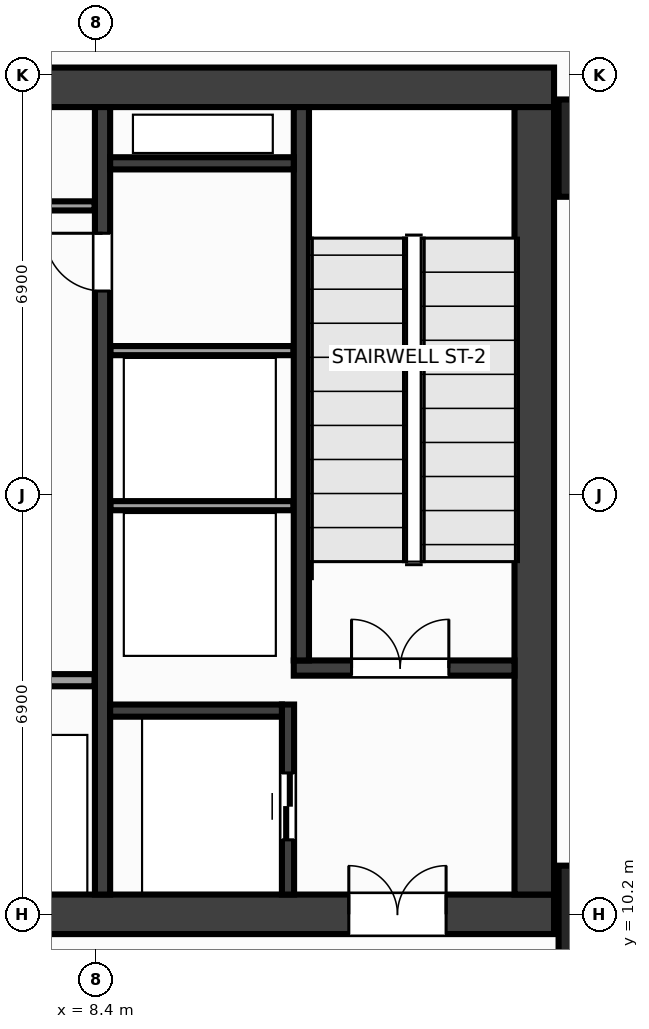
"""IFC4 building model, lengths in metres.
Left out: names, types, materials, properties, quantities, classifications, styles, units other than length and angle.
Written with IfcOpenShell. Run it as: python <this file> out.ifc"""

import sys

from ifc_helpers import new_model, si_unit, direction, frame, frame_2d, origin, origin_2d, place, context, subcontext, project, spatial, rectangle, extrude, source, transform, mapped, element, fill, save


model = new_model("IFC4")
c1 = context("Model", 3, precision=1e-05, world=origin(), true_north=direction((0.0, 1.0)))
c2 = subcontext(c1, "Body", "Model", "MODEL_VIEW")
j1 = project(units=[si_unit("LENGTHUNIT", "METRE"), si_unit("PLANEANGLEUNIT", "RADIAN")], contexts=[c1])
p1 = place(None, origin())
s1 = spatial("IfcSite", under=j1, at=p1, CompositionType="ELEMENT")
p2 = place(p1, origin())
s2 = spatial("IfcBuilding", under=s1, at=p2, CompositionType="ELEMENT")
p3 = place(p2, frame((0.0, 0.0, 189.2)))
s3 = spatial("IfcBuildingStorey", under=s2, at=p3, CompositionType="ELEMENT", Elevation=189.2)
m1 = source(origin(), c2, "Body", "SweptSolid", [
    extrude(rectangle(XDim=31.85, YDim=0.65, at=frame_2d((15.925, 0.0))), origin(), (0.0, 0.0, 1.0), 7.2),
])
p4 = place(p3, frame((-15.925, 23.8, 0.0), z_axis=(0.0, 0.0, 1.0), x_axis=(1.0, 0.0, 0.0)))
e1 = element("IfcWall", 1, at=p4, inside=s3, PredefinedType="SHEAR", context=c2, shape_type="MappedRepresentation", body=[
    mapped(m1, transform((0.0, 0.0, 0.0), x_axis=(1.0, 0.0, 0.0), y_axis=(0.0, 1.0, 0.0), z_axis=(0.0, 0.0, 1.0), scale=1.0)),
])
p5 = place(p3, frame((-15.925, 10.2, 0.0), z_axis=(0.0, 0.0, 1.0), x_axis=(1.0, 0.0, 0.0)))
e2 = element("IfcWall", 2, at=p5, inside=s3, PredefinedType="SHEAR", context=c2, shape_type="MappedRepresentation", body=[
    mapped(m1, transform((0.0, 0.0, 0.0), x_axis=(1.0, 0.0, 0.0), y_axis=(0.0, 1.0, 0.0), z_axis=(0.0, 0.0, 1.0), scale=1.0)),
])
p6 = place(p5, frame((1.775, 0.0, 0.0)))
e3 = element("IfcOpeningElement", 3, at=p6, cuts=e2, PredefinedType="OPENING", context=c2, shape_type="SweptSolid", body=[
    extrude(rectangle(XDim=1.6, YDim=2.15, at=frame_2d((0.8, 1.075))), frame((0.0, 0.337, 0.0), z_axis=(0.0, -1.0, 0.0), x_axis=(1.0, 0.0, 0.0)), (0.0, 0.0, 1.0), 0.674),
])
p7 = place(p5, frame((28.475, 0.0, 0.0)))
e4 = element("IfcOpeningElement", 4, at=p7, cuts=e2, PredefinedType="OPENING", context=c2, shape_type="SweptSolid", body=[
    extrude(rectangle(XDim=1.6, YDim=2.15, at=frame_2d((0.8, 1.075))), frame((0.0, 0.337, 0.0), z_axis=(0.0, -1.0, 0.0), x_axis=(1.0, 0.0, 0.0)), (0.0, 0.0, 1.0), 0.674),
])
p8 = place(p5, frame((15.175, 0.0, 0.0)))
e5 = element("IfcOpeningElement", 5, at=p8, cuts=e2, PredefinedType="OPENING", context=c2, shape_type="SweptSolid", body=[
    extrude(rectangle(XDim=1.5, YDim=2.2, at=frame_2d((0.75, 1.1))), frame((0.0, 0.337, 0.0), z_axis=(0.0, -1.0, 0.0), x_axis=(1.0, 0.0, 0.0)), (0.0, 0.0, 1.0), 0.674),
])
m2 = source(origin(), c2, "Body", "SweptSolid", [
    extrude(rectangle(XDim=12.95, YDim=0.65, at=frame_2d((6.475, 0.0))), origin(), (0.0, 0.0, 1.0), 7.2),
])
p9 = place(p3, frame((15.6, 10.525, 0.0), z_axis=(0.0, 0.0, 1.0), x_axis=(0.0, 1.0, 0.0)))
e6 = element("IfcWall", 6, at=p9, inside=s3, PredefinedType="SHEAR", context=c2, shape_type="MappedRepresentation", body=[
    mapped(m2, transform((0.0, 0.0, 0.0), x_axis=(1.0, 0.0, 0.0), y_axis=(0.0, 1.0, 0.0), z_axis=(0.0, 0.0, 1.0), scale=1.0)),
])
m3 = source(origin(), c2, "Body", "SweptSolid", [
    extrude(rectangle(XDim=12.95, YDim=0.25, at=frame_2d((6.475, 0.0))), origin(), (0.0, 0.0, 1.0), 7.2),
])
p10 = place(p3, frame((8.5, 10.525, 0.0), z_axis=(0.0, 0.0, 1.0), x_axis=(0.0, 1.0, 0.0)))
e7 = element("IfcWall", 7, at=p10, inside=s3, PredefinedType="SHEAR", context=c2, shape_type="MappedRepresentation", body=[
    mapped(m3, transform((0.0, 0.0, 0.0), x_axis=(1.0, 0.0, 0.0), y_axis=(0.0, 1.0, 0.0), z_axis=(0.0, 0.0, 1.0), scale=1.0)),
])
p11 = place(p10, frame((9.925, 0.0, 0.0)))
e8 = element("IfcOpeningElement", 8, at=p11, cuts=e7, PredefinedType="OPENING", context=c2, shape_type="SweptSolid", body=[
    extrude(rectangle(XDim=0.95, YDim=2.15, at=frame_2d((0.475, 1.075))), frame((0.0, 0.137, 0.0), z_axis=(0.0, -1.0, 0.0), x_axis=(1.0, 0.0, 0.0)), (0.0, 0.0, 1.0), 0.274),
])
m4 = source(origin(), c2, "Body", "SweptSolid", [
    extrude(rectangle(XDim=3.63, YDim=0.25, at=frame_2d((1.815, 0.0))), origin(), (0.0, 0.0, 1.0), 7.2),
])
p12 = place(p3, frame((11.645, 14.25, 0.0), z_axis=(0.0, 0.0, 1.0), x_axis=(1.0, 0.0, 0.0)))
e9 = element("IfcWall", 9, at=p12, inside=s3, PredefinedType="SHEAR", context=c2, shape_type="MappedRepresentation", body=[
    mapped(m4, transform((0.0, 0.0, 0.0), x_axis=(1.0, 0.0, 0.0), y_axis=(0.0, 1.0, 0.0), z_axis=(0.0, 0.0, 1.0), scale=1.0)),
])
p13 = place(p12, frame((0.95, 0.0, 0.0)))
e10 = element("IfcOpeningElement", 10, at=p13, cuts=e9, PredefinedType="OPENING", context=c2, shape_type="SweptSolid", body=[
    extrude(rectangle(XDim=1.6, YDim=2.15, at=frame_2d((0.8, 1.075))), frame((0.0, 0.137, 0.0), z_axis=(0.0, -1.0, 0.0), x_axis=(1.0, 0.0, 0.0)), (0.0, 0.0, 1.0), 0.274),
])
m5 = source(origin(), c2, "Body", "SweptSolid", [
    extrude(rectangle(XDim=9.1, YDim=0.25, at=frame_2d((4.55, 0.0))), origin(), (0.0, 0.0, 1.0), 7.2),
])
p14 = place(p3, frame((11.77, 14.375, 0.0), z_axis=(0.0, 0.0, 1.0), x_axis=(0.0, 1.0, 0.0)))
e11 = element("IfcWall", 11, at=p14, inside=s3, PredefinedType="SHEAR", context=c2, shape_type="MappedRepresentation", body=[
    mapped(m5, transform((0.0, 0.0, 0.0), x_axis=(1.0, 0.0, 0.0), y_axis=(0.0, 1.0, 0.0), z_axis=(0.0, 0.0, 1.0), scale=1.0)),
])
m6 = source(origin(), c2, "Body", "SweptSolid", [
    extrude(rectangle(XDim=3.125, YDim=0.2, at=frame_2d((1.562, 0.0))), origin(), (0.0, 0.0, 1.0), 7.2),
])
p15 = place(p3, frame((11.55, 10.525, 0.0), z_axis=(0.0, 0.0, 1.0), x_axis=(0.0, 1.0, 0.0)))
e12 = element("IfcWall", 12, at=p15, inside=s3, PredefinedType="SHEAR", context=c2, shape_type="MappedRepresentation", body=[
    mapped(m6, transform((0.0, 0.0, 0.0), x_axis=(1.0, 0.0, 0.0), y_axis=(0.0, 1.0, 0.0), z_axis=(0.0, 0.0, 1.0), scale=1.0)),
])
p16 = place(p15, frame((0.9, 0.0, 0.0)))
e13 = element("IfcOpeningElement", 13, at=p16, cuts=e12, PredefinedType="OPENING", context=c2, shape_type="SweptSolid", body=[
    extrude(rectangle(XDim=1.1, YDim=2.15, at=frame_2d((0.55, 1.075))), frame((0.0, 0.112, 0.0), z_axis=(0.0, -1.0, 0.0), x_axis=(1.0, 0.0, 0.0)), (0.0, 0.0, 1.0), 0.224),
])
m7 = source(origin(), c2, "Body", "SweptSolid", [
    extrude(rectangle(XDim=2.825, YDim=0.2, at=frame_2d((1.413, 0.0))), origin(), (0.0, 0.0, 1.0), 7.2),
])
p17 = place(p3, frame((8.625, 13.55, 0.0), z_axis=(0.0, 0.0, 1.0), x_axis=(1.0, 0.0, 0.0)))
e14 = element("IfcWall", 14, at=p17, inside=s3, PredefinedType="SHEAR", context=c2, shape_type="MappedRepresentation", body=[
    mapped(m7, transform((0.0, 0.0, 0.0), x_axis=(1.0, 0.0, 0.0), y_axis=(0.0, 1.0, 0.0), z_axis=(0.0, 0.0, 1.0), scale=1.0)),
])
m8 = source(origin(), c2, "Body", "SweptSolid", [
    extrude(rectangle(XDim=3.02, YDim=0.2, at=frame_2d((1.51, 0.0))), origin(), (0.0, 0.0, 1.0), 7.2),
])
p18 = place(p3, frame((8.625, 22.55, 0.0), z_axis=(0.0, 0.0, 1.0), x_axis=(1.0, 0.0, 0.0)))
e15 = element("IfcWall", 15, at=p18, inside=s3, PredefinedType="SHEAR", context=c2, shape_type="MappedRepresentation", body=[
    mapped(m8, transform((0.0, 0.0, 0.0), x_axis=(1.0, 0.0, 0.0), y_axis=(0.0, 1.0, 0.0), z_axis=(0.0, 0.0, 1.0), scale=1.0)),
])
m9 = source(origin(), c2, "Body", "SweptSolid", [
    extrude(rectangle(XDim=1.6, YDim=1.6, at=origin_2d()), origin(), (0.0, 0.0, 1.0), 7.2),
])
for number, where, z_axis, x_axis in (
    (16, (16.8, 10.2, 0.0), (0.0, 0.0, 1.0), (1.0, 0.0, 0.0)),
    (17, (16.8, 22.8, 0.0), (0.0, 0.0, 1.0), (1.0, 0.0, 0.0)),
):
    element("IfcColumn", number, at=place(p3, frame(where, z_axis=z_axis, x_axis=x_axis)), inside=s3, PredefinedType="COLUMN", context=c2, shape_type="MappedRepresentation", body=[
        mapped(m9, transform((0.0, 0.0, 0.0), x_axis=(1.0, 0.0, 0.0), y_axis=(0.0, 1.0, 0.0), z_axis=(0.0, 0.0, 1.0), scale=1.0)),
    ])
m10 = source(origin(), c2, "Body", "SweptSolid", [
    extrude(rectangle(XDim=3.01, YDim=0.15, at=frame_2d((1.505, 0.0))), origin(), (0.0, 0.0, 1.0), 6.9),
])
for number, where, z_axis, x_axis in (
    (18, (8.63, 16.92, 0.0), (0.0, 0.0, 1.0), (1.0, 0.0, 0.0)),
    (19, (8.63, 19.47, 0.0), (0.0, 0.0, 1.0), (1.0, 0.0, 0.0)),
):
    element("IfcWall", number, at=place(p3, frame(where, z_axis=z_axis, x_axis=x_axis)), inside=s3, PredefinedType="PARTITIONING", context=c2, shape_type="MappedRepresentation", body=[
        mapped(m10, transform((0.0, 0.0, 0.0), x_axis=(1.0, 0.0, 0.0), y_axis=(0.0, 1.0, 0.0), z_axis=(0.0, 0.0, 1.0), scale=1.0)),
    ])
m11 = source(origin(), c2, "Body", "SweptSolid", [
    extrude(rectangle(XDim=7.07, YDim=0.2, at=frame_2d((3.535, 0.0))), origin(), (0.0, 0.0, 1.0), 6.9),
])
p19 = place(p3, frame((1.3, 14.05, 0.0), z_axis=(0.0, 0.0, 1.0), x_axis=(1.0, 0.0, 0.0)))
e20 = element("IfcWall", 20, at=p19, inside=s3, PredefinedType="PARTITIONING", context=c2, shape_type="MappedRepresentation", body=[
    mapped(m11, transform((0.0, 0.0, 0.0), x_axis=(1.0, 0.0, 0.0), y_axis=(0.0, 1.0, 0.0), z_axis=(0.0, 0.0, 1.0), scale=1.0)),
])
m12 = source(origin(), c2, "Body", "SweptSolid", [
    extrude(rectangle(XDim=2.07, YDim=0.15, at=frame_2d((1.035, 0.0))), origin(), (0.0, 0.0, 1.0), 6.9),
])
p20 = place(p3, frame((6.3, 21.85, 0.0), z_axis=(0.0, 0.0, 1.0), x_axis=(1.0, 0.0, 0.0)))
e21 = element("IfcWall", 21, at=p20, inside=s3, PredefinedType="PARTITIONING", context=c2, shape_type="MappedRepresentation", body=[
    mapped(m12, transform((0.0, 0.0, 0.0), x_axis=(1.0, 0.0, 0.0), y_axis=(0.0, 1.0, 0.0), z_axis=(0.0, 0.0, 1.0), scale=1.0)),
])
m13 = source(origin(), c2, "Body", "SweptSolid", [
    extrude(rectangle(XDim=1.6, YDim=2.15, at=frame_2d((0.8, 1.075))), frame((0.0, 0.025, 0.0), z_axis=(0.0, -1.0, 0.0), x_axis=(1.0, 0.0, 0.0)), (0.0, 0.0, 1.0), 0.05),
])
p21 = place(p13, origin())
e22 = element("IfcDoor", 22, at=p21, inside=s3, OperationType="DOUBLE_DOOR_SINGLE_SWING", PredefinedType="DOOR", context=c2, shape_type="MappedRepresentation", body=[
    mapped(m13, transform((0.0, 0.0, 0.0), x_axis=(1.0, 0.0, 0.0), y_axis=(0.0, 1.0, 0.0), z_axis=(0.0, 0.0, 1.0), scale=1.0)),
])
fill(e10, e22)
p22 = place(p7, origin())
e23 = element("IfcDoor", 23, at=p22, inside=s3, OperationType="DOUBLE_DOOR_SINGLE_SWING", PredefinedType="DOOR", context=c2, shape_type="MappedRepresentation", body=[
    mapped(m13, transform((0.0, 0.0, 0.0), x_axis=(1.0, 0.0, 0.0), y_axis=(0.0, 1.0, 0.0), z_axis=(0.0, 0.0, 1.0), scale=1.0)),
])
fill(e4, e23)
m14 = source(origin(), c2, "Body", "SweptSolid", [
    extrude(rectangle(XDim=1.1, YDim=2.15, at=frame_2d((0.55, 1.075))), frame((0.0, 0.025, 0.0), z_axis=(0.0, -1.0, 0.0), x_axis=(1.0, 0.0, 0.0)), (0.0, 0.0, 1.0), 0.05),
])
p23 = place(p16, origin())
e24 = element("IfcDoor", 24, at=p23, inside=s3, OperationType="DOUBLE_DOOR_SLIDING", PredefinedType="DOOR", context=c2, shape_type="MappedRepresentation", body=[
    mapped(m14, transform((0.0, 0.0, 0.0), x_axis=(1.0, 0.0, 0.0), y_axis=(0.0, 1.0, 0.0), z_axis=(0.0, 0.0, 1.0), scale=1.0)),
])
fill(e13, e24)
m15 = source(origin(), c2, "Body", "SweptSolid", [
    extrude(rectangle(XDim=0.95, YDim=2.15, at=frame_2d((0.475, 1.075))), frame((0.0, 0.025, 0.0), z_axis=(0.0, -1.0, 0.0), x_axis=(1.0, 0.0, 0.0)), (0.0, 0.0, 1.0), 0.05),
])
p24 = place(p11, origin())
e25 = element("IfcDoor", 25, at=p24, inside=s3, OperationType="SINGLE_SWING_RIGHT", PredefinedType="DOOR", context=c2, shape_type="MappedRepresentation", body=[
    mapped(m15, transform((0.0, 0.0, 0.0), x_axis=(1.0, 0.0, 0.0), y_axis=(0.0, 1.0, 0.0), z_axis=(0.0, 0.0, 1.0), scale=1.0)),
])
fill(e8, e25)
save(model, sys.argv[1])
